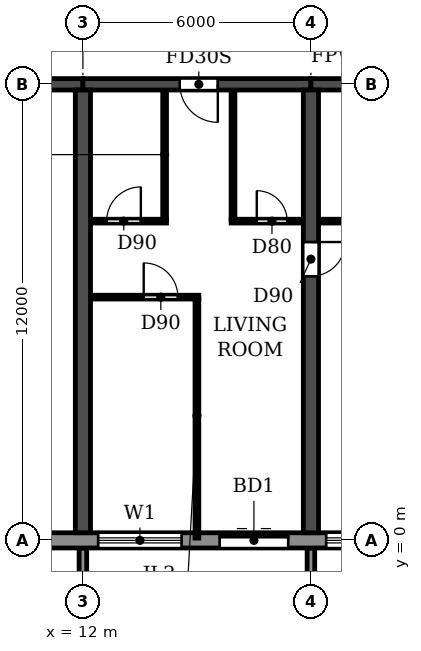
"""IFC4 building model, lengths in metres.
Left out: names, types, materials, properties, quantities, classifications, styles, units other than length and angle.
Written with IfcOpenShell. Run it as: python <this file> out.ifc"""

import sys

from ifc_helpers import new_model, si_unit, direction, frame, frame_2d, origin, place, context, subcontext, project, spatial, polyline, rectangle, outline, extrude, source, transform, mapped, element, fill, save


model = new_model("IFC4")
c1 = context("Model", 3, precision=1e-05, world=origin(), true_north=direction((0.0, 1.0)))
c2 = subcontext(c1, "Body", "Model", "MODEL_VIEW")
j1 = project(units=[si_unit("LENGTHUNIT", "METRE"), si_unit("PLANEANGLEUNIT", "RADIAN")], contexts=[c1])
p1 = place(None, origin())
s1 = spatial("IfcSite", under=j1, at=p1, CompositionType="ELEMENT")
p2 = place(p1, origin())
s2 = spatial("IfcBuilding", under=s1, at=p2, CompositionType="ELEMENT")
p3 = place(p2, frame((0.0, 0.0, 63.0)))
s3 = spatial("IfcBuildingStorey", under=s2, at=p3, CompositionType="ELEMENT", Elevation=63.0)
p4 = place(p3, frame((12.0, 0.2, 0.0), z_axis=(0.0, 0.0, 1.0), x_axis=(0.0, 1.0, 0.0)))
e1 = element("IfcWall", 1, at=p4, inside=s3, PredefinedType="SHEAR", context=c2, shape_type="SweptSolid", body=[
    extrude(rectangle(XDim=11.65, YDim=0.4, at=frame_2d((5.825, 0.0))), origin(), (0.0, 0.0, 1.0), 2.95),
])
p5 = place(p3, frame((18.0, 0.2, 0.0), z_axis=(0.0, 0.0, 1.0), x_axis=(0.0, 1.0, 0.0)))
e2 = element("IfcWall", 2, at=p5, inside=s3, PredefinedType="SHEAR", context=c2, shape_type="SweptSolid", body=[
    extrude(rectangle(XDim=11.65, YDim=0.4, at=frame_2d((5.825, 0.0))), origin(), (0.0, 0.0, 1.0), 2.95),
])
p6 = place(p5, frame((6.75, 0.0, 0.0)))
e3 = element("IfcOpeningElement", 3, at=p6, cuts=e2, PredefinedType="OPENING", context=c2, shape_type="SweptSolid", body=[
    extrude(rectangle(XDim=0.9, YDim=2.1, at=frame_2d((0.45, 1.05))), frame((0.0, 0.21, 0.0), z_axis=(0.0, -1.0, 0.0), x_axis=(1.0, 0.0, 0.0)), (0.0, 0.0, 1.0), 0.42),
])
p7 = place(p3, frame((6.2, 12.0, 0.0), z_axis=(0.0, 0.0, 1.0), x_axis=(1.0, 0.0, 0.0)))
e4 = element("IfcWall", 4, at=p7, inside=s3, PredefinedType="SHEAR", context=c2, shape_type="SweptSolid", body=[
    extrude(rectangle(XDim=5.8, YDim=0.3, at=frame_2d((2.9, 0.0))), origin(), (0.0, 0.0, 1.0), 2.35),
])
p8 = place(p7, frame((2.3, 0.0, 0.0)))
e5 = element("IfcOpeningElement", 5, at=p8, cuts=e4, PredefinedType="OPENING", context=c2, shape_type="SweptSolid", body=[
    extrude(rectangle(XDim=1.0, YDim=2.1, at=frame_2d((0.5, 1.05))), frame((0.0, 0.16, 0.0), z_axis=(0.0, -1.0, 0.0), x_axis=(1.0, 0.0, 0.0)), (0.0, 0.0, 1.0), 0.32),
])
p9 = place(p3, frame((12.0, 12.0, 0.0), z_axis=(0.0, 0.0, 1.0), x_axis=(1.0, 0.0, 0.0)))
e6 = element("IfcWall", 6, at=p9, inside=s3, PredefinedType="SHEAR", context=c2, shape_type="SweptSolid", body=[
    extrude(rectangle(XDim=6.0, YDim=0.3, at=frame_2d((3.0, 0.0))), origin(), (0.0, 0.0, 1.0), 2.35),
])
p10 = place(p9, frame((2.55, 0.0, 0.0)))
e7 = element("IfcOpeningElement", 7, at=p10, cuts=e6, PredefinedType="OPENING", context=c2, shape_type="SweptSolid", body=[
    extrude(rectangle(XDim=1.0, YDim=2.1, at=frame_2d((0.5, 1.05))), frame((0.0, 0.16, 0.0), z_axis=(0.0, -1.0, 0.0), x_axis=(1.0, 0.0, 0.0)), (0.0, 0.0, 1.0), 0.32),
])
p11 = place(p3, frame((18.0, 12.0, 0.0), z_axis=(0.0, 0.0, 1.0), x_axis=(1.0, 0.0, 0.0)))
e8 = element("IfcWall", 8, at=p11, inside=s3, PredefinedType="SHEAR", context=c2, shape_type="SweptSolid", body=[
    extrude(rectangle(XDim=6.0, YDim=0.3, at=frame_2d((3.0, 0.0))), origin(), (0.0, 0.0, 1.0), 2.35),
])
p12 = place(p3, frame((10.683, 0.0, 0.0), z_axis=(0.0, 0.0, 1.0), x_axis=(1.0, 0.0, 0.0)))
e9 = element("IfcWall", 9, at=p12, inside=s3, PredefinedType="STANDARD", context=c2, shape_type="SweptSolid", body=[
    extrude(rectangle(XDim=80.634, YDim=0.4, at=frame_2d((40.317, 0.0))), origin(), (0.0, 0.0, 1.0), 2.95),
])
p13 = place(p12, frame((1.717, 0.0, 0.9)))
e10 = element("IfcOpeningElement", 10, at=p13, cuts=e9, PredefinedType="OPENING", context=c2, shape_type="SweptSolid", body=[
    extrude(rectangle(XDim=2.2, YDim=1.5, at=frame_2d((1.1, 0.75))), frame((0.0, 0.21, 0.0), z_axis=(0.0, -1.0, 0.0), x_axis=(1.0, 0.0, 0.0)), (0.0, 0.0, 1.0), 0.42),
])
p14 = place(p12, frame((4.917, 0.0, 0.0)))
e11 = element("IfcOpeningElement", 11, at=p14, cuts=e9, PredefinedType="OPENING", context=c2, shape_type="SweptSolid", body=[
    extrude(rectangle(XDim=1.8, YDim=2.4, at=frame_2d((0.9, 1.2))), frame((0.0, 0.21, 0.0), z_axis=(0.0, -1.0, 0.0), x_axis=(1.0, 0.0, 0.0)), (0.0, 0.0, 1.0), 0.42),
])
p15 = place(p12, frame((7.717, 0.0, 0.9)))
e12 = element("IfcOpeningElement", 12, at=p15, cuts=e9, PredefinedType="OPENING", context=c2, shape_type="SweptSolid", body=[
    extrude(rectangle(XDim=2.2, YDim=1.5, at=frame_2d((1.1, 0.75))), frame((0.0, 0.21, 0.0), z_axis=(0.0, -1.0, 0.0), x_axis=(1.0, 0.0, 0.0)), (0.0, 0.0, 1.0), 0.42),
])
p16 = place(p12, frame((10.717, 0.0, 0.9)))
e13 = element("IfcOpeningElement", 13, at=p16, cuts=e9, PredefinedType="OPENING", context=c2, shape_type="SweptSolid", body=[
    extrude(rectangle(XDim=2.2, YDim=1.5, at=frame_2d((1.1, 0.75))), frame((0.0, 0.21, 0.0), z_axis=(0.0, -1.0, 0.0), x_axis=(1.0, 0.0, 0.0)), (0.0, 0.0, 1.0), 0.42),
])
p17 = place(p12, frame((13.717, 0.0, 0.9)))
e14 = element("IfcOpeningElement", 14, at=p17, cuts=e9, PredefinedType="OPENING", context=c2, shape_type="SweptSolid", body=[
    extrude(rectangle(XDim=2.2, YDim=1.5, at=frame_2d((1.1, 0.75))), frame((0.0, 0.21, 0.0), z_axis=(0.0, -1.0, 0.0), x_axis=(1.0, 0.0, 0.0)), (0.0, 0.0, 1.0), 0.42),
])
p18 = place(p12, frame((16.917, 0.0, 0.0)))
e15 = element("IfcOpeningElement", 15, at=p18, cuts=e9, PredefinedType="OPENING", context=c2, shape_type="SweptSolid", body=[
    extrude(rectangle(XDim=1.8, YDim=2.4, at=frame_2d((0.9, 1.2))), frame((0.0, 0.21, 0.0), z_axis=(0.0, -1.0, 0.0), x_axis=(1.0, 0.0, 0.0)), (0.0, 0.0, 1.0), 0.42),
])
p19 = place(p12, frame((19.717, 0.0, 0.9)))
e16 = element("IfcOpeningElement", 16, at=p19, cuts=e9, PredefinedType="OPENING", context=c2, shape_type="SweptSolid", body=[
    extrude(rectangle(XDim=2.2, YDim=1.5, at=frame_2d((1.1, 0.75))), frame((0.0, 0.21, 0.0), z_axis=(0.0, -1.0, 0.0), x_axis=(1.0, 0.0, 0.0)), (0.0, 0.0, 1.0), 0.42),
])
p20 = place(p12, frame((22.717, 0.0, 0.9)))
e17 = element("IfcOpeningElement", 17, at=p20, cuts=e9, PredefinedType="OPENING", context=c2, shape_type="SweptSolid", body=[
    extrude(rectangle(XDim=2.2, YDim=1.5, at=frame_2d((1.1, 0.75))), frame((0.0, 0.21, 0.0), z_axis=(0.0, -1.0, 0.0), x_axis=(1.0, 0.0, 0.0)), (0.0, 0.0, 1.0), 0.42),
])
p21 = place(p12, frame((25.917, 0.0, 0.0)))
e18 = element("IfcOpeningElement", 18, at=p21, cuts=e9, PredefinedType="OPENING", context=c2, shape_type="SweptSolid", body=[
    extrude(rectangle(XDim=1.8, YDim=2.4, at=frame_2d((0.9, 1.2))), frame((0.0, 0.21, 0.0), z_axis=(0.0, -1.0, 0.0), x_axis=(1.0, 0.0, 0.0)), (0.0, 0.0, 1.0), 0.42),
])
p22 = place(p12, frame((28.717, 0.0, 0.9)))
e19 = element("IfcOpeningElement", 19, at=p22, cuts=e9, PredefinedType="OPENING", context=c2, shape_type="SweptSolid", body=[
    extrude(rectangle(XDim=2.2, YDim=1.5, at=frame_2d((1.1, 0.75))), frame((0.0, 0.21, 0.0), z_axis=(0.0, -1.0, 0.0), x_axis=(1.0, 0.0, 0.0)), (0.0, 0.0, 1.0), 0.42),
])
p23 = place(p12, frame((31.717, 0.0, 0.9)))
e20 = element("IfcOpeningElement", 20, at=p23, cuts=e9, PredefinedType="OPENING", context=c2, shape_type="SweptSolid", body=[
    extrude(rectangle(XDim=2.2, YDim=1.5, at=frame_2d((1.1, 0.75))), frame((0.0, 0.21, 0.0), z_axis=(0.0, -1.0, 0.0), x_axis=(1.0, 0.0, 0.0)), (0.0, 0.0, 1.0), 0.42),
])
p24 = place(p12, frame((34.717, 0.0, 0.9)))
e21 = element("IfcOpeningElement", 21, at=p24, cuts=e9, PredefinedType="OPENING", context=c2, shape_type="SweptSolid", body=[
    extrude(rectangle(XDim=2.2, YDim=1.5, at=frame_2d((1.1, 0.75))), frame((0.0, 0.21, 0.0), z_axis=(0.0, -1.0, 0.0), x_axis=(1.0, 0.0, 0.0)), (0.0, 0.0, 1.0), 0.42),
])
p25 = place(p12, frame((37.717, 0.0, 0.9)))
e22 = element("IfcOpeningElement", 22, at=p25, cuts=e9, PredefinedType="OPENING", context=c2, shape_type="SweptSolid", body=[
    extrude(rectangle(XDim=2.2, YDim=1.5, at=frame_2d((1.1, 0.75))), frame((0.0, 0.21, 0.0), z_axis=(0.0, -1.0, 0.0), x_axis=(1.0, 0.0, 0.0)), (0.0, 0.0, 1.0), 0.42),
])
p26 = place(p12, frame((40.917, 0.0, 0.0)))
e23 = element("IfcOpeningElement", 23, at=p26, cuts=e9, PredefinedType="OPENING", context=c2, shape_type="SweptSolid", body=[
    extrude(rectangle(XDim=1.8, YDim=2.4, at=frame_2d((0.9, 1.2))), frame((0.0, 0.21, 0.0), z_axis=(0.0, -1.0, 0.0), x_axis=(1.0, 0.0, 0.0)), (0.0, 0.0, 1.0), 0.42),
])
p27 = place(p12, frame((43.717, 0.0, 0.9)))
e24 = element("IfcOpeningElement", 24, at=p27, cuts=e9, PredefinedType="OPENING", context=c2, shape_type="SweptSolid", body=[
    extrude(rectangle(XDim=2.2, YDim=1.5, at=frame_2d((1.1, 0.75))), frame((0.0, 0.21, 0.0), z_axis=(0.0, -1.0, 0.0), x_axis=(1.0, 0.0, 0.0)), (0.0, 0.0, 1.0), 0.42),
])
p28 = place(p12, frame((46.717, 0.0, 0.9)))
e25 = element("IfcOpeningElement", 25, at=p28, cuts=e9, PredefinedType="OPENING", context=c2, shape_type="SweptSolid", body=[
    extrude(rectangle(XDim=2.2, YDim=1.5, at=frame_2d((1.1, 0.75))), frame((0.0, 0.21, 0.0), z_axis=(0.0, -1.0, 0.0), x_axis=(1.0, 0.0, 0.0)), (0.0, 0.0, 1.0), 0.42),
])
p29 = place(p12, frame((49.717, 0.0, 0.9)))
e26 = element("IfcOpeningElement", 26, at=p29, cuts=e9, PredefinedType="OPENING", context=c2, shape_type="SweptSolid", body=[
    extrude(rectangle(XDim=2.2, YDim=1.5, at=frame_2d((1.1, 0.75))), frame((0.0, 0.21, 0.0), z_axis=(0.0, -1.0, 0.0), x_axis=(1.0, 0.0, 0.0)), (0.0, 0.0, 1.0), 0.42),
])
p30 = place(p12, frame((52.717, 0.0, 0.9)))
e27 = element("IfcOpeningElement", 27, at=p30, cuts=e9, PredefinedType="OPENING", context=c2, shape_type="SweptSolid", body=[
    extrude(rectangle(XDim=2.2, YDim=1.5, at=frame_2d((1.1, 0.75))), frame((0.0, 0.21, 0.0), z_axis=(0.0, -1.0, 0.0), x_axis=(1.0, 0.0, 0.0)), (0.0, 0.0, 1.0), 0.42),
])
p31 = place(p12, frame((55.717, 0.0, 0.9)))
e28 = element("IfcOpeningElement", 28, at=p31, cuts=e9, PredefinedType="OPENING", context=c2, shape_type="SweptSolid", body=[
    extrude(rectangle(XDim=2.2, YDim=1.5, at=frame_2d((1.1, 0.75))), frame((0.0, 0.21, 0.0), z_axis=(0.0, -1.0, 0.0), x_axis=(1.0, 0.0, 0.0)), (0.0, 0.0, 1.0), 0.42),
])
p32 = place(p12, frame((58.717, 0.0, 0.9)))
e29 = element("IfcOpeningElement", 29, at=p32, cuts=e9, PredefinedType="OPENING", context=c2, shape_type="SweptSolid", body=[
    extrude(rectangle(XDim=2.2, YDim=1.5, at=frame_2d((1.1, 0.75))), frame((0.0, 0.21, 0.0), z_axis=(0.0, -1.0, 0.0), x_axis=(1.0, 0.0, 0.0)), (0.0, 0.0, 1.0), 0.42),
])
p33 = place(p12, frame((61.717, 0.0, 0.9)))
e30 = element("IfcOpeningElement", 30, at=p33, cuts=e9, PredefinedType="OPENING", context=c2, shape_type="SweptSolid", body=[
    extrude(rectangle(XDim=2.2, YDim=1.5, at=frame_2d((1.1, 0.75))), frame((0.0, 0.21, 0.0), z_axis=(0.0, -1.0, 0.0), x_axis=(1.0, 0.0, 0.0)), (0.0, 0.0, 1.0), 0.42),
])
p34 = place(p12, frame((64.917, 0.0, 0.0)))
e31 = element("IfcOpeningElement", 31, at=p34, cuts=e9, PredefinedType="OPENING", context=c2, shape_type="SweptSolid", body=[
    extrude(rectangle(XDim=1.8, YDim=2.4, at=frame_2d((0.9, 1.2))), frame((0.0, 0.21, 0.0), z_axis=(0.0, -1.0, 0.0), x_axis=(1.0, 0.0, 0.0)), (0.0, 0.0, 1.0), 0.42),
])
p35 = place(p12, frame((67.717, 0.0, 0.9)))
e32 = element("IfcOpeningElement", 32, at=p35, cuts=e9, PredefinedType="OPENING", context=c2, shape_type="SweptSolid", body=[
    extrude(rectangle(XDim=2.2, YDim=1.5, at=frame_2d((1.1, 0.75))), frame((0.0, 0.21, 0.0), z_axis=(0.0, -1.0, 0.0), x_axis=(1.0, 0.0, 0.0)), (0.0, 0.0, 1.0), 0.42),
])
p36 = place(p12, frame((70.717, 0.0, 0.9)))
e33 = element("IfcOpeningElement", 33, at=p36, cuts=e9, PredefinedType="OPENING", context=c2, shape_type="SweptSolid", body=[
    extrude(rectangle(XDim=2.2, YDim=1.5, at=frame_2d((1.1, 0.75))), frame((0.0, 0.21, 0.0), z_axis=(0.0, -1.0, 0.0), x_axis=(1.0, 0.0, 0.0)), (0.0, 0.0, 1.0), 0.42),
])
p37 = place(p12, frame((73.717, 0.0, 0.9)))
e34 = element("IfcOpeningElement", 34, at=p37, cuts=e9, PredefinedType="OPENING", context=c2, shape_type="SweptSolid", body=[
    extrude(rectangle(XDim=2.2, YDim=1.5, at=frame_2d((1.1, 0.75))), frame((0.0, 0.21, 0.0), z_axis=(0.0, -1.0, 0.0), x_axis=(1.0, 0.0, 0.0)), (0.0, 0.0, 1.0), 0.42),
])
p38 = place(p12, frame((76.917, 0.0, 0.0)))
e35 = element("IfcOpeningElement", 35, at=p38, cuts=e9, PredefinedType="OPENING", context=c2, shape_type="SweptSolid", body=[
    extrude(rectangle(XDim=1.8, YDim=2.4, at=frame_2d((0.9, 1.2))), frame((0.0, 0.21, 0.0), z_axis=(0.0, -1.0, 0.0), x_axis=(1.0, 0.0, 0.0)), (0.0, 0.0, 1.0), 0.42),
])
m1 = source(origin(), c2, "Body", "SweptSolid", [
    extrude(outline(polyline([(0.0, 0.0), (0.2, 0.0), (0.2, 1.65), (0.0, 1.65), (0.0, 0.0)])), origin(), (0.0, 0.0, 1.0), 3.1),
])
for number, where in (
    (36, (11.9, -1.85, 0.0)),
    (37, (17.9, -1.85, 0.0)),
):
    element("IfcWall", number, at=place(p3, frame(where)), inside=s3, PredefinedType="STANDARD", context=c2, shape_type="MappedRepresentation", body=[
        mapped(m1, transform((0.0, 0.0, 0.0))),
    ])
p39 = place(p3, frame((12.21, 6.4, 0.0), z_axis=(0.0, 0.0, 1.0), x_axis=(1.0, 0.0, 0.0)))
e38 = element("IfcWall", 38, at=p39, inside=s3, PredefinedType="PARTITIONING", context=c2, shape_type="SweptSolid", body=[
    extrude(rectangle(XDim=2.84, YDim=0.1, at=frame_2d((1.42, 0.0))), origin(), (0.0, 0.0, 1.0), 2.95),
])
p40 = place(p39, frame((1.39, 0.0, 0.0)))
e39 = element("IfcOpeningElement", 39, at=p40, cuts=e38, PredefinedType="OPENING", context=c2, shape_type="SweptSolid", body=[
    extrude(rectangle(XDim=0.9, YDim=2.1, at=frame_2d((0.45, 1.05))), frame((0.0, 0.06, 0.0), z_axis=(0.0, -1.0, 0.0), x_axis=(1.0, 0.0, 0.0)), (0.0, 0.0, 1.0), 0.12),
])
p41 = place(p3, frame((12.21, 8.4, 0.0), z_axis=(0.0, 0.0, 1.0), x_axis=(1.0, 0.0, 0.0)))
e40 = element("IfcWall", 40, at=p41, inside=s3, PredefinedType="PARTITIONING", context=c2, shape_type="SweptSolid", body=[
    extrude(rectangle(XDim=1.99, YDim=0.1, at=frame_2d((0.995, 0.0))), origin(), (0.0, 0.0, 1.0), 2.95),
])
p42 = place(p41, frame((0.415, 0.0, 0.0)))
e41 = element("IfcOpeningElement", 41, at=p42, cuts=e40, PredefinedType="OPENING", context=c2, shape_type="SweptSolid", body=[
    extrude(rectangle(XDim=0.9, YDim=2.1, at=frame_2d((0.45, 1.05))), frame((0.0, 0.06, 0.0), z_axis=(0.0, -1.0, 0.0), x_axis=(1.0, 0.0, 0.0)), (0.0, 0.0, 1.0), 0.12),
])
p43 = place(p3, frame((15.9, 8.4, 0.0), z_axis=(0.0, 0.0, 1.0), x_axis=(1.0, 0.0, 0.0)))
e42 = element("IfcWall", 42, at=p43, inside=s3, PredefinedType="PARTITIONING", context=c2, shape_type="SweptSolid", body=[
    extrude(rectangle(XDim=1.89, YDim=0.1, at=frame_2d((0.945, 0.0))), origin(), (0.0, 0.0, 1.0), 2.95),
])
p44 = place(p43, frame((0.675, 0.0, 0.0)))
e43 = element("IfcOpeningElement", 43, at=p44, cuts=e42, PredefinedType="OPENING", context=c2, shape_type="SweptSolid", body=[
    extrude(rectangle(XDim=0.8, YDim=2.1, at=frame_2d((0.4, 1.05))), frame((0.0, 0.06, 0.0), z_axis=(0.0, -1.0, 0.0), x_axis=(1.0, 0.0, 0.0)), (0.0, 0.0, 1.0), 0.12),
])
p45 = place(p3, frame((18.21, 8.4, 0.0), z_axis=(0.0, 0.0, 1.0), x_axis=(1.0, 0.0, 0.0)))
e44 = element("IfcWall", 44, at=p45, inside=s3, PredefinedType="PARTITIONING", context=c2, shape_type="SweptSolid", body=[
    extrude(rectangle(XDim=5.58, YDim=0.1, at=frame_2d((2.79, 0.0))), origin(), (0.0, 0.0, 1.0), 2.95),
])
p46 = place(p45, frame((0.89, 0.0, 0.0)))
e45 = element("IfcOpeningElement", 45, at=p46, cuts=e44, PredefinedType="OPENING", context=c2, shape_type="SweptSolid", body=[
    extrude(rectangle(XDim=0.8, YDim=2.1, at=frame_2d((0.4, 1.05))), frame((0.0, 0.06, 0.0), z_axis=(0.0, -1.0, 0.0), x_axis=(1.0, 0.0, 0.0)), (0.0, 0.0, 1.0), 0.12),
])
p47 = place(p45, frame((3.89, 0.0, 0.0)))
e46 = element("IfcOpeningElement", 46, at=p47, cuts=e44, PredefinedType="OPENING", context=c2, shape_type="SweptSolid", body=[
    extrude(rectangle(XDim=0.8, YDim=2.1, at=frame_2d((0.4, 1.05))), frame((0.0, 0.06, 0.0), z_axis=(0.0, -1.0, 0.0), x_axis=(1.0, 0.0, 0.0)), (0.0, 0.0, 1.0), 0.12),
])
p48 = place(p3, frame((14.15, 8.45, 0.0), z_axis=(0.0, 0.0, 1.0), x_axis=(0.0, 1.0, 0.0)))
e47 = element("IfcWall", 47, at=p48, inside=s3, PredefinedType="PARTITIONING", context=c2, shape_type="SweptSolid", body=[
    extrude(rectangle(XDim=3.39, YDim=0.1, at=frame_2d((1.695, 0.0))), origin(), (0.0, 0.0, 1.0), 2.95),
])
p49 = place(p3, frame((15.0, 0.06, 0.0), z_axis=(0.0, 0.0, 1.0), x_axis=(0.0, 1.0, 0.0)))
e48 = element("IfcWall", 48, at=p49, inside=s3, PredefinedType="PARTITIONING", context=c2, shape_type="SweptSolid", body=[
    extrude(rectangle(XDim=6.29, YDim=0.1, at=frame_2d((3.145, 0.0))), origin(), (0.0, 0.0, 1.0), 2.95),
])
p50 = place(p3, frame((15.95, 8.45, 0.0), z_axis=(0.0, 0.0, 1.0), x_axis=(0.0, 1.0, 0.0)))
e49 = element("IfcWall", 49, at=p50, inside=s3, PredefinedType="PARTITIONING", context=c2, shape_type="SweptSolid", body=[
    extrude(rectangle(XDim=3.39, YDim=0.1, at=frame_2d((1.695, 0.0))), origin(), (0.0, 0.0, 1.0), 2.95),
])
p51 = place(p13, origin())
e50 = element("IfcWindow", 50, at=p51, inside=s3, PartitioningType="DOUBLE_PANEL_HORIZONTAL", PredefinedType="WINDOW", context=c2, shape_type="SweptSolid", body=[
    extrude(rectangle(XDim=2.2, YDim=1.5, at=frame_2d((1.1, 0.75))), frame((0.0, 0.03, 0.0), z_axis=(0.0, -1.0, 0.0), x_axis=(1.0, 0.0, 0.0)), (0.0, 0.0, 1.0), 0.06),
])
fill(e10, e50)
p52 = place(p14, origin())
e51 = element("IfcDoor", 51, at=p52, inside=s3, OperationType="DOUBLE_DOOR_SLIDING", PredefinedType="DOOR", context=c2, shape_type="SweptSolid", body=[
    extrude(rectangle(XDim=1.8, YDim=2.4, at=frame_2d((0.9, 1.2))), frame((0.0, 0.025, 0.0), z_axis=(0.0, -1.0, 0.0), x_axis=(1.0, 0.0, 0.0)), (0.0, 0.0, 1.0), 0.05),
])
fill(e11, e51)
p53 = place(p15, origin())
e52 = element("IfcWindow", 52, at=p53, inside=s3, PartitioningType="DOUBLE_PANEL_HORIZONTAL", PredefinedType="WINDOW", context=c2, shape_type="SweptSolid", body=[
    extrude(rectangle(XDim=2.2, YDim=1.5, at=frame_2d((1.1, 0.75))), frame((0.0, 0.03, 0.0), z_axis=(0.0, -1.0, 0.0), x_axis=(1.0, 0.0, 0.0)), (0.0, 0.0, 1.0), 0.06),
])
fill(e12, e52)
p54 = place(p42, origin())
e53 = element("IfcDoor", 53, at=p54, inside=s3, OperationType="SINGLE_SWING_RIGHT", PredefinedType="DOOR", context=c2, shape_type="SweptSolid", body=[
    extrude(rectangle(XDim=0.9, YDim=2.1, at=frame_2d((0.45, 1.05))), frame((0.0, 0.025, 0.0), z_axis=(0.0, -1.0, 0.0), x_axis=(1.0, 0.0, 0.0)), (0.0, 0.0, 1.0), 0.05),
])
fill(e41, e53)
p55 = place(p40, origin())
e54 = element("IfcDoor", 54, at=p55, inside=s3, OperationType="SINGLE_SWING_LEFT", PredefinedType="DOOR", context=c2, shape_type="SweptSolid", body=[
    extrude(rectangle(XDim=0.9, YDim=2.1, at=frame_2d((0.45, 1.05))), frame((0.0, 0.025, 0.0), z_axis=(0.0, -1.0, 0.0), x_axis=(1.0, 0.0, 0.0)), (0.0, 0.0, 1.0), 0.05),
])
fill(e39, e54)
p56 = place(p10, frame((1.0, 0.0, 0.0), z_axis=(0.0, 0.0, 1.0), x_axis=(-1.0, 0.0, 0.0)))
e55 = element("IfcDoor", 55, at=p56, inside=s3, OperationType="SINGLE_SWING_LEFT", PredefinedType="DOOR", context=c2, shape_type="SweptSolid", body=[
    extrude(rectangle(XDim=1.0, YDim=2.1, at=frame_2d((0.5, 1.05))), frame((0.0, 0.025, 0.0), z_axis=(0.0, -1.0, 0.0), x_axis=(1.0, 0.0, 0.0)), (0.0, 0.0, 1.0), 0.05),
])
fill(e7, e55)
p57 = place(p44, origin())
e56 = element("IfcDoor", 56, at=p57, inside=s3, OperationType="SINGLE_SWING_LEFT", PredefinedType="DOOR", context=c2, shape_type="SweptSolid", body=[
    extrude(rectangle(XDim=0.8, YDim=2.1, at=frame_2d((0.4, 1.05))), frame((0.0, 0.025, 0.0), z_axis=(0.0, -1.0, 0.0), x_axis=(1.0, 0.0, 0.0)), (0.0, 0.0, 1.0), 0.05),
])
fill(e43, e56)
p58 = place(p6, frame((0.9, 0.0, 0.0), z_axis=(0.0, 0.0, 1.0), x_axis=(-1.0, 0.0, 0.0)))
e57 = element("IfcDoor", 57, at=p58, inside=s3, OperationType="SINGLE_SWING_LEFT", PredefinedType="DOOR", context=c2, shape_type="SweptSolid", body=[
    extrude(rectangle(XDim=0.9, YDim=2.1, at=frame_2d((0.45, 1.05))), frame((0.0, 0.025, 0.0), z_axis=(0.0, -1.0, 0.0), x_axis=(1.0, 0.0, 0.0)), (0.0, 0.0, 1.0), 0.05),
])
fill(e3, e57)
save(model, sys.argv[1])
